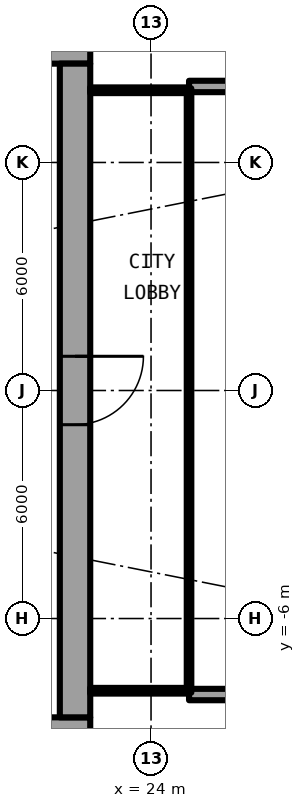
"""IFC4 building model, lengths in metres.
Left out: names, types, materials, properties, quantities, classifications, styles, units other than length and angle.
Written with IfcOpenShell. Run it as: python <this file> out.ifc"""

import sys

from ifc_helpers import new_model, si_unit, direction, frame, frame_2d, origin, place, context, subcontext, project, spatial, rectangle, extrude, element, fill, save


model = new_model("IFC4")
c1 = context("Model", 3, precision=1e-05, world=origin(), true_north=direction((0.0, 1.0)))
c2 = subcontext(c1, "Body", "Model", "MODEL_VIEW")
j1 = project(units=[si_unit("LENGTHUNIT", "METRE"), si_unit("PLANEANGLEUNIT", "RADIAN")], contexts=[c1])
p1 = place(None, origin())
s1 = spatial("IfcSite", under=j1, at=p1, CompositionType="ELEMENT")
p2 = place(p1, origin())
s2 = spatial("IfcBuilding", under=s1, at=p2, CompositionType="ELEMENT")
p3 = place(p2, frame((0.0, 0.0, 50.25)))
s3 = spatial("IfcBuildingStorey", under=s2, at=p3, CompositionType="ELEMENT", Elevation=50.25)
for number, where, z_axis, x_axis in (
    (1, (25.0, 8.0, 0.0), (0.0, 0.0, 1.0), (1.0, 0.0, 0.0)),
    (2, (25.0, -8.0, 0.0), (0.0, 0.0, 1.0), (1.0, 0.0, 0.0)),
):
    element("IfcWall", number, at=place(p3, frame(where, z_axis=z_axis, x_axis=x_axis)), inside=s3, PredefinedType="SOLIDWALL", context=c2, shape_type="SweptSolid", body=[
        extrude(rectangle(XDim=2.667, YDim=0.3, at=frame_2d((1.333, 0.0))), origin(), (0.0, 0.0, 1.0), 2.7),
    ])
p4 = place(p3, frame((22.4, 9.0, 0.0), z_axis=(0.0, 0.0, 1.0), x_axis=(-1.0, 0.0, 0.0)))
e3 = element("IfcWall", 3, at=p4, inside=s3, PredefinedType="SHEAR", context=c2, shape_type="SweptSolid", body=[
    extrude(rectangle(XDim=14.2, YDim=0.8, at=frame_2d((7.1, 0.0))), origin(), (0.0, 0.0, 1.0), 3.05),
])
p5 = place(p4, frame((1.325, 0.0, 0.0)))
e4 = element("IfcOpeningElement", 4, at=p5, cuts=e3, PredefinedType="OPENING", context=c2, shape_type="SweptSolid", body=[
    extrude(rectangle(XDim=1.2, YDim=2.3, at=frame_2d((0.6, 1.15))), frame((0.0, 0.41, 0.0), z_axis=(0.0, -1.0, 0.0), x_axis=(1.0, 0.0, 0.0)), (0.0, 0.0, 1.0), 0.82),
])
p6 = place(p3, frame((8.2, -9.0, 0.0), z_axis=(0.0, 0.0, 1.0), x_axis=(1.0, 0.0, 0.0)))
e5 = element("IfcWall", 5, at=p6, inside=s3, PredefinedType="SHEAR", context=c2, shape_type="SweptSolid", body=[
    extrude(rectangle(XDim=14.2, YDim=0.8, at=frame_2d((7.1, 0.0))), origin(), (0.0, 0.0, 1.0), 3.05),
])
p7 = place(p6, frame((11.675, 0.0, 0.0)))
e6 = element("IfcOpeningElement", 6, at=p7, cuts=e5, PredefinedType="OPENING", context=c2, shape_type="SweptSolid", body=[
    extrude(rectangle(XDim=1.2, YDim=2.3, at=frame_2d((0.6, 1.15))), frame((0.0, 0.41, 0.0), z_axis=(0.0, -1.0, 0.0), x_axis=(1.0, 0.0, 0.0)), (0.0, 0.0, 1.0), 0.82),
])
p8 = place(p3, frame((22.0, 8.6, 0.0), z_axis=(0.0, 0.0, 1.0), x_axis=(0.0, -1.0, 0.0)))
e7 = element("IfcWall", 7, at=p8, inside=s3, PredefinedType="SHEAR", context=c2, shape_type="SweptSolid", body=[
    extrude(rectangle(XDim=17.2, YDim=0.8, at=frame_2d((8.6, 0.0))), origin(), (0.0, 0.0, 1.0), 3.05),
])
p9 = place(p8, frame((7.7, 0.0, 0.0)))
e8 = element("IfcOpeningElement", 8, at=p9, cuts=e7, PredefinedType="OPENING", context=c2, shape_type="SweptSolid", body=[
    extrude(rectangle(XDim=1.8, YDim=2.3, at=frame_2d((0.9, 1.15))), frame((0.0, 0.41, 0.0), z_axis=(0.0, -1.0, 0.0), x_axis=(1.0, 0.0, 0.0)), (0.0, 0.0, 1.0), 0.82),
])
for number, where, z_axis, x_axis in (
    (9, (22.4, -7.9, 0.0), (0.0, 0.0, 1.0), (1.0, 0.0, 0.0)),
    (10, (22.4, 7.9, 0.0), (0.0, 0.0, 1.0), (1.0, 0.0, 0.0)),
):
    element("IfcWall", number, at=place(p3, frame(where, z_axis=z_axis, x_axis=x_axis)), inside=s3, PredefinedType="PARTITIONING", context=c2, shape_type="SweptSolid", body=[
        extrude(rectangle(XDim=2.54, YDim=0.15, at=frame_2d((1.27, 0.0))), origin(), (0.0, 0.0, 1.0), 2.7),
    ])
p10 = place(p3, frame((25.0, -7.95, 0.0), z_axis=(0.0, 0.0, 1.0), x_axis=(0.0, 1.0, 0.0)))
e11 = element("IfcWall", 11, at=p10, inside=s3, PredefinedType="PARTITIONING", context=c2, shape_type="SweptSolid", body=[
    extrude(rectangle(XDim=15.9, YDim=0.12, at=frame_2d((7.95, 0.0))), origin(), (0.0, 0.0, 1.0), 2.7),
])
p11 = place(p10, frame((0.95, 0.0, 0.1)))
e12 = element("IfcOpeningElement", 12, at=p11, cuts=e11, PredefinedType="OPENING", context=c2, shape_type="SweptSolid", body=[
    extrude(rectangle(XDim=14.0, YDim=2.35, at=frame_2d((7.0, 1.175))), frame((0.0, 0.07, 0.0), z_axis=(0.0, -1.0, 0.0), x_axis=(1.0, 0.0, 0.0)), (0.0, 0.0, 1.0), 0.14),
])
p12 = place(p9, origin())
e13 = element("IfcDoor", 13, at=p12, inside=s3, OperationType="SINGLE_SWING_LEFT", PredefinedType="DOOR", context=c2, shape_type="SweptSolid", body=[
    extrude(rectangle(XDim=1.8, YDim=2.3, at=frame_2d((0.9, 1.15))), frame((0.0, 0.025, 0.0), z_axis=(0.0, -1.0, 0.0), x_axis=(1.0, 0.0, 0.0)), (0.0, 0.0, 1.0), 0.05),
])
fill(e8, e13)
p13 = place(p11, origin())
e14 = element("IfcWindow", 14, at=p13, inside=s3, PartitioningType="SINGLE_PANEL", PredefinedType="WINDOW", context=c2, shape_type="SweptSolid", body=[
    extrude(rectangle(XDim=14.0, YDim=2.35, at=frame_2d((7.0, 1.175))), frame((0.0, 0.03, 0.0), z_axis=(0.0, -1.0, 0.0), x_axis=(1.0, 0.0, 0.0)), (0.0, 0.0, 1.0), 0.06),
])
fill(e12, e14)
save(model, sys.argv[1])
